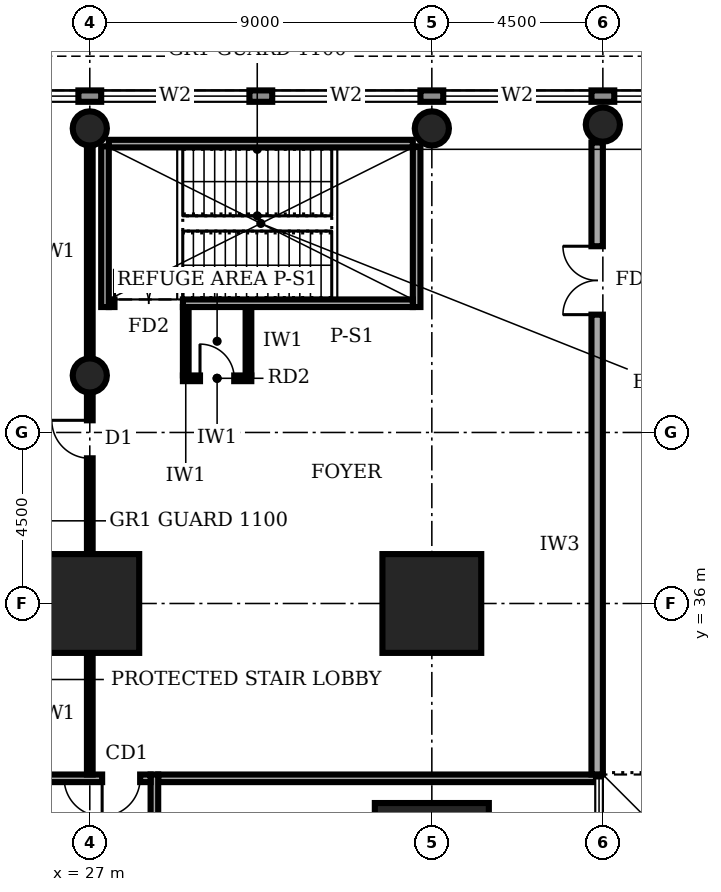
"""IFC4 building model, lengths in metres.
Left out: names, types, materials, properties, quantities, classifications, styles, units other than length and angle.
Written with IfcOpenShell. Run it as: python <this file> out.ifc"""

import sys

from ifc_helpers import new_model, si_unit, direction, frame, frame_2d, origin, origin_2d, place, context, subcontext, project, spatial, rectangle, circle, extrude, element, fill, save


model = new_model("IFC4")
c1 = context("Model", 3, precision=1e-05, world=origin(), true_north=direction((0.0, 1.0)))
c2 = subcontext(c1, "Body", "Model", "MODEL_VIEW")
j1 = project(units=[si_unit("LENGTHUNIT", "METRE"), si_unit("PLANEANGLEUNIT", "RADIAN")], contexts=[c1])
p1 = place(None, origin())
s1 = spatial("IfcSite", under=j1, at=p1, CompositionType="ELEMENT")
p2 = place(p1, origin())
s2 = spatial("IfcBuilding", under=s1, at=p2, CompositionType="ELEMENT")
p3 = place(p2, frame((0.0, 0.0, 6.0)))
s3 = spatial("IfcBuildingStorey", under=s2, at=p3, CompositionType="ELEMENT", Elevation=6.0)
p4 = place(p3, frame((36.0, 29.25, 0.0), z_axis=(0.0, 0.0, 1.0), x_axis=(1.0, 0.0, 0.0)))
e1 = element("IfcColumn", 1, at=p4, inside=s3, PredefinedType="COLUMN", context=c2, shape_type="SweptSolid", body=[
    extrude(rectangle(XDim=3.0, YDim=3.0, at=origin_2d()), origin(), (0.0, 0.0, 1.0), 5.0),
])
for number, where, z_axis, x_axis in (
    (2, (27.0, 36.0, 0.0), (0.0, 0.0, 1.0), (1.0, 0.0, 0.0)),
    (3, (36.0, 36.0, 0.0), (0.0, 0.0, 1.0), (1.0, 0.0, 0.0)),
):
    element("IfcColumn", number, at=place(p3, frame(where, z_axis=z_axis, x_axis=x_axis)), inside=s3, PredefinedType="COLUMN", context=c2, shape_type="SweptSolid", body=[
        extrude(rectangle(XDim=2.6, YDim=2.6, at=origin_2d()), origin(), (0.0, 0.0, 1.0), 5.0),
    ])
for number, where, z_axis, x_axis in (
    (4, (27.0, 42.0, 0.0), (0.0, 0.0, 1.0), (1.0, 0.0, 0.0)),
    (5, (27.0, 48.5, 0.0), (0.0, 0.0, 1.0), (1.0, 0.0, 0.0)),
    (6, (36.0, 48.5, 0.0), (0.0, 0.0, 1.0), (1.0, 0.0, 0.0)),
    (7, (40.5, 48.6, 0.0), (0.0, 0.0, 1.0), (1.0, 0.0, 0.0)),
):
    element("IfcColumn", number, at=place(p3, frame(where, z_axis=z_axis, x_axis=x_axis)), inside=s3, PredefinedType="COLUMN", context=c2, shape_type="SweptSolid", body=[
        extrude(circle(Radius=0.45, at=origin_2d()), origin(), (0.0, 0.0, 1.0), 5.0),
    ])
p5 = place(p3, frame((98.98, 49.35, 0.0), z_axis=(0.0, 0.0, 1.0), x_axis=(-1.0, 0.0, 0.0)))
e8 = element("IfcWall", 8, at=p5, inside=s3, PredefinedType="STANDARD", context=c2, shape_type="SweptSolid", body=[
    extrude(rectangle(XDim=98.96, YDim=0.3, at=frame_2d((49.48, 0.0))), origin(), (0.0, 0.0, 1.0), 4.7),
])
p6 = place(p5, frame((94.78, 0.0, 0.6)))
e9 = element("IfcOpeningElement", 9, at=p6, cuts=e8, PredefinedType="OPENING", context=c2, shape_type="SweptSolid", body=[
    extrude(rectangle(XDim=3.9, YDim=2.6, at=frame_2d((1.95, 1.3))), frame((0.0, 0.16, 0.0), z_axis=(0.0, -1.0, 0.0), x_axis=(1.0, 0.0, 0.0)), (0.0, 0.0, 1.0), 0.32),
])
p7 = place(p5, frame((90.28, 0.0, 0.6)))
e10 = element("IfcOpeningElement", 10, at=p7, cuts=e8, PredefinedType="OPENING", context=c2, shape_type="SweptSolid", body=[
    extrude(rectangle(XDim=3.9, YDim=2.6, at=frame_2d((1.95, 1.3))), frame((0.0, 0.16, 0.0), z_axis=(0.0, -1.0, 0.0), x_axis=(1.0, 0.0, 0.0)), (0.0, 0.0, 1.0), 0.32),
])
p8 = place(p5, frame((85.78, 0.0, 0.6)))
e11 = element("IfcOpeningElement", 11, at=p8, cuts=e8, PredefinedType="OPENING", context=c2, shape_type="SweptSolid", body=[
    extrude(rectangle(XDim=3.9, YDim=2.6, at=frame_2d((1.95, 1.3))), frame((0.0, 0.16, 0.0), z_axis=(0.0, -1.0, 0.0), x_axis=(1.0, 0.0, 0.0)), (0.0, 0.0, 1.0), 0.32),
])
p9 = place(p5, frame((81.28, 0.0, 0.6)))
e12 = element("IfcOpeningElement", 12, at=p9, cuts=e8, PredefinedType="OPENING", context=c2, shape_type="SweptSolid", body=[
    extrude(rectangle(XDim=3.9, YDim=2.6, at=frame_2d((1.95, 1.3))), frame((0.0, 0.16, 0.0), z_axis=(0.0, -1.0, 0.0), x_axis=(1.0, 0.0, 0.0)), (0.0, 0.0, 1.0), 0.32),
])
p10 = place(p5, frame((76.78, 0.0, 0.6)))
e13 = element("IfcOpeningElement", 13, at=p10, cuts=e8, PredefinedType="OPENING", context=c2, shape_type="SweptSolid", body=[
    extrude(rectangle(XDim=3.9, YDim=2.6, at=frame_2d((1.95, 1.3))), frame((0.0, 0.16, 0.0), z_axis=(0.0, -1.0, 0.0), x_axis=(1.0, 0.0, 0.0)), (0.0, 0.0, 1.0), 0.32),
])
p11 = place(p5, frame((72.28, 0.0, 0.6)))
e14 = element("IfcOpeningElement", 14, at=p11, cuts=e8, PredefinedType="OPENING", context=c2, shape_type="SweptSolid", body=[
    extrude(rectangle(XDim=3.9, YDim=2.6, at=frame_2d((1.95, 1.3))), frame((0.0, 0.16, 0.0), z_axis=(0.0, -1.0, 0.0), x_axis=(1.0, 0.0, 0.0)), (0.0, 0.0, 1.0), 0.32),
])
p12 = place(p5, frame((67.78, 0.0, 0.6)))
e15 = element("IfcOpeningElement", 15, at=p12, cuts=e8, PredefinedType="OPENING", context=c2, shape_type="SweptSolid", body=[
    extrude(rectangle(XDim=3.9, YDim=2.6, at=frame_2d((1.95, 1.3))), frame((0.0, 0.16, 0.0), z_axis=(0.0, -1.0, 0.0), x_axis=(1.0, 0.0, 0.0)), (0.0, 0.0, 1.0), 0.32),
])
p13 = place(p5, frame((63.28, 0.0, 0.6)))
e16 = element("IfcOpeningElement", 16, at=p13, cuts=e8, PredefinedType="OPENING", context=c2, shape_type="SweptSolid", body=[
    extrude(rectangle(XDim=3.9, YDim=2.6, at=frame_2d((1.95, 1.3))), frame((0.0, 0.16, 0.0), z_axis=(0.0, -1.0, 0.0), x_axis=(1.0, 0.0, 0.0)), (0.0, 0.0, 1.0), 0.32),
])
p14 = place(p5, frame((58.78, 0.0, 0.6)))
e17 = element("IfcOpeningElement", 17, at=p14, cuts=e8, PredefinedType="OPENING", context=c2, shape_type="SweptSolid", body=[
    extrude(rectangle(XDim=3.9, YDim=2.6, at=frame_2d((1.95, 1.3))), frame((0.0, 0.16, 0.0), z_axis=(0.0, -1.0, 0.0), x_axis=(1.0, 0.0, 0.0)), (0.0, 0.0, 1.0), 0.32),
])
p15 = place(p5, frame((54.28, 0.0, 0.6)))
e18 = element("IfcOpeningElement", 18, at=p15, cuts=e8, PredefinedType="OPENING", context=c2, shape_type="SweptSolid", body=[
    extrude(rectangle(XDim=3.9, YDim=2.6, at=frame_2d((1.95, 1.3))), frame((0.0, 0.16, 0.0), z_axis=(0.0, -1.0, 0.0), x_axis=(1.0, 0.0, 0.0)), (0.0, 0.0, 1.0), 0.32),
])
p16 = place(p5, frame((49.78, 0.0, 0.6)))
e19 = element("IfcOpeningElement", 19, at=p16, cuts=e8, PredefinedType="OPENING", context=c2, shape_type="SweptSolid", body=[
    extrude(rectangle(XDim=3.9, YDim=2.6, at=frame_2d((1.95, 1.3))), frame((0.0, 0.16, 0.0), z_axis=(0.0, -1.0, 0.0), x_axis=(1.0, 0.0, 0.0)), (0.0, 0.0, 1.0), 0.32),
])
p17 = place(p5, frame((45.28, 0.0, 0.6)))
e20 = element("IfcOpeningElement", 20, at=p17, cuts=e8, PredefinedType="OPENING", context=c2, shape_type="SweptSolid", body=[
    extrude(rectangle(XDim=3.9, YDim=2.6, at=frame_2d((1.95, 1.3))), frame((0.0, 0.16, 0.0), z_axis=(0.0, -1.0, 0.0), x_axis=(1.0, 0.0, 0.0)), (0.0, 0.0, 1.0), 0.32),
])
p18 = place(p5, frame((40.78, 0.0, 0.6)))
e21 = element("IfcOpeningElement", 21, at=p18, cuts=e8, PredefinedType="OPENING", context=c2, shape_type="SweptSolid", body=[
    extrude(rectangle(XDim=3.9, YDim=2.6, at=frame_2d((1.95, 1.3))), frame((0.0, 0.16, 0.0), z_axis=(0.0, -1.0, 0.0), x_axis=(1.0, 0.0, 0.0)), (0.0, 0.0, 1.0), 0.32),
])
p19 = place(p5, frame((36.28, 0.0, 0.6)))
e22 = element("IfcOpeningElement", 22, at=p19, cuts=e8, PredefinedType="OPENING", context=c2, shape_type="SweptSolid", body=[
    extrude(rectangle(XDim=3.9, YDim=2.6, at=frame_2d((1.95, 1.3))), frame((0.0, 0.16, 0.0), z_axis=(0.0, -1.0, 0.0), x_axis=(1.0, 0.0, 0.0)), (0.0, 0.0, 1.0), 0.32),
])
p20 = place(p5, frame((31.78, 0.0, 0.6)))
e23 = element("IfcOpeningElement", 23, at=p20, cuts=e8, PredefinedType="OPENING", context=c2, shape_type="SweptSolid", body=[
    extrude(rectangle(XDim=3.9, YDim=2.6, at=frame_2d((1.95, 1.3))), frame((0.0, 0.16, 0.0), z_axis=(0.0, -1.0, 0.0), x_axis=(1.0, 0.0, 0.0)), (0.0, 0.0, 1.0), 0.32),
])
p21 = place(p5, frame((27.28, 0.0, 0.6)))
e24 = element("IfcOpeningElement", 24, at=p21, cuts=e8, PredefinedType="OPENING", context=c2, shape_type="SweptSolid", body=[
    extrude(rectangle(XDim=3.9, YDim=2.6, at=frame_2d((1.95, 1.3))), frame((0.0, 0.16, 0.0), z_axis=(0.0, -1.0, 0.0), x_axis=(1.0, 0.0, 0.0)), (0.0, 0.0, 1.0), 0.32),
])
p22 = place(p5, frame((22.78, 0.0, 0.6)))
e25 = element("IfcOpeningElement", 25, at=p22, cuts=e8, PredefinedType="OPENING", context=c2, shape_type="SweptSolid", body=[
    extrude(rectangle(XDim=3.9, YDim=2.6, at=frame_2d((1.95, 1.3))), frame((0.0, 0.16, 0.0), z_axis=(0.0, -1.0, 0.0), x_axis=(1.0, 0.0, 0.0)), (0.0, 0.0, 1.0), 0.32),
])
p23 = place(p5, frame((18.28, 0.0, 0.6)))
e26 = element("IfcOpeningElement", 26, at=p23, cuts=e8, PredefinedType="OPENING", context=c2, shape_type="SweptSolid", body=[
    extrude(rectangle(XDim=3.9, YDim=2.6, at=frame_2d((1.95, 1.3))), frame((0.0, 0.16, 0.0), z_axis=(0.0, -1.0, 0.0), x_axis=(1.0, 0.0, 0.0)), (0.0, 0.0, 1.0), 0.32),
])
p24 = place(p5, frame((13.78, 0.0, 0.6)))
e27 = element("IfcOpeningElement", 27, at=p24, cuts=e8, PredefinedType="OPENING", context=c2, shape_type="SweptSolid", body=[
    extrude(rectangle(XDim=3.9, YDim=2.6, at=frame_2d((1.95, 1.3))), frame((0.0, 0.16, 0.0), z_axis=(0.0, -1.0, 0.0), x_axis=(1.0, 0.0, 0.0)), (0.0, 0.0, 1.0), 0.32),
])
p25 = place(p5, frame((9.28, 0.0, 0.6)))
e28 = element("IfcOpeningElement", 28, at=p25, cuts=e8, PredefinedType="OPENING", context=c2, shape_type="SweptSolid", body=[
    extrude(rectangle(XDim=3.9, YDim=2.6, at=frame_2d((1.95, 1.3))), frame((0.0, 0.16, 0.0), z_axis=(0.0, -1.0, 0.0), x_axis=(1.0, 0.0, 0.0)), (0.0, 0.0, 1.0), 0.32),
])
p26 = place(p5, frame((4.78, 0.0, 0.6)))
e29 = element("IfcOpeningElement", 29, at=p26, cuts=e8, PredefinedType="OPENING", context=c2, shape_type="SweptSolid", body=[
    extrude(rectangle(XDim=3.9, YDim=2.6, at=frame_2d((1.95, 1.3))), frame((0.0, 0.16, 0.0), z_axis=(0.0, -1.0, 0.0), x_axis=(1.0, 0.0, 0.0)), (0.0, 0.0, 1.0), 0.32),
])
p27 = place(p3, frame((28.7, 9.2, 0.0), z_axis=(0.0, 0.0, 1.0), x_axis=(0.0, 1.0, 0.0)))
e30 = element("IfcWall", 30, at=p27, inside=s3, PredefinedType="SOLIDWALL", context=c2, shape_type="SweptSolid", body=[
    extrude(rectangle(XDim=22.3, YDim=0.2, at=frame_2d((11.15, 0.0))), origin(), (0.0, 0.0, 1.0), 4.7),
])
p28 = place(p27, frame((1.55, 0.0, 0.0)))
e31 = element("IfcOpeningElement", 31, at=p28, cuts=e30, PredefinedType="OPENING", context=c2, shape_type="SweptSolid", body=[
    extrude(rectangle(XDim=1.0, YDim=2.1, at=frame_2d((0.5, 1.05))), frame((0.0, 0.11, 0.0), z_axis=(0.0, -1.0, 0.0), x_axis=(1.0, 0.0, 0.0)), (0.0, 0.0, 1.0), 0.22),
])
p29 = place(p27, frame((7.9, 0.0, 0.0)))
e32 = element("IfcOpeningElement", 32, at=p29, cuts=e30, PredefinedType="OPENING", context=c2, shape_type="SweptSolid", body=[
    extrude(rectangle(XDim=1.8, YDim=2.1, at=frame_2d((0.9, 1.05))), frame((0.0, 0.11, 0.0), z_axis=(0.0, -1.0, 0.0), x_axis=(1.0, 0.0, 0.0)), (0.0, 0.0, 1.0), 0.22),
])
p30 = place(p27, frame((16.9, 0.0, 0.0)))
e33 = element("IfcOpeningElement", 33, at=p30, cuts=e30, PredefinedType="OPENING", context=c2, shape_type="SweptSolid", body=[
    extrude(rectangle(XDim=1.8, YDim=2.1, at=frame_2d((0.9, 1.05))), frame((0.0, 0.11, 0.0), z_axis=(0.0, -1.0, 0.0), x_axis=(1.0, 0.0, 0.0)), (0.0, 0.0, 1.0), 0.22),
])
p31 = place(p3, frame((28.6, 31.4, 0.0), z_axis=(0.0, 0.0, 1.0), x_axis=(-1.0, 0.0, 0.0)))
e34 = element("IfcWall", 34, at=p31, inside=s3, PredefinedType="SOLIDWALL", context=c2, shape_type="SweptSolid", body=[
    extrude(rectangle(XDim=16.9, YDim=0.2, at=frame_2d((8.45, 0.0))), origin(), (0.0, 0.0, 1.0), 4.7),
])
p32 = place(p31, frame((15.4, 0.0, 0.0)))
e35 = element("IfcOpeningElement", 35, at=p32, cuts=e34, PredefinedType="OPENING", context=c2, shape_type="SweptSolid", body=[
    extrude(rectangle(XDim=1.2, YDim=2.4, at=frame_2d((0.6, 1.2))), frame((0.0, 0.11, 0.0), z_axis=(0.0, -1.0, 0.0), x_axis=(1.0, 0.0, 0.0)), (0.0, 0.0, 1.0), 0.22),
])
p33 = place(p31, frame((12.35, 0.0, 0.0)))
e36 = element("IfcOpeningElement", 36, at=p33, cuts=e34, PredefinedType="OPENING", context=c2, shape_type="SweptSolid", body=[
    extrude(rectangle(XDim=1.0, YDim=2.1, at=frame_2d((0.5, 1.05))), frame((0.0, 0.11, 0.0), z_axis=(0.0, -1.0, 0.0), x_axis=(1.0, 0.0, 0.0)), (0.0, 0.0, 1.0), 0.22),
])
p34 = place(p31, frame((7.85, 0.0, 0.0)))
e37 = element("IfcOpeningElement", 37, at=p34, cuts=e34, PredefinedType="OPENING", context=c2, shape_type="SweptSolid", body=[
    extrude(rectangle(XDim=1.0, YDim=2.1, at=frame_2d((0.5, 1.05))), frame((0.0, 0.11, 0.0), z_axis=(0.0, -1.0, 0.0), x_axis=(1.0, 0.0, 0.0)), (0.0, 0.0, 1.0), 0.22),
])
p35 = place(p31, frame((0.275, 0.0, 0.0)))
e38 = element("IfcOpeningElement", 38, at=p35, cuts=e34, PredefinedType="OPENING", context=c2, shape_type="SweptSolid", body=[
    extrude(rectangle(XDim=1.0, YDim=2.1, at=frame_2d((0.5, 1.05))), frame((0.0, 0.11, 0.0), z_axis=(0.0, -1.0, 0.0), x_axis=(1.0, 0.0, 0.0)), (0.0, 0.0, 1.0), 0.22),
])
p36 = place(p31, frame((3.35, 0.0, 0.0)))
e39 = element("IfcOpeningElement", 39, at=p36, cuts=e34, PredefinedType="OPENING", context=c2, shape_type="SweptSolid", body=[
    extrude(rectangle(XDim=1.0, YDim=2.1, at=frame_2d((0.5, 1.05))), frame((0.0, 0.11, 0.0), z_axis=(0.0, -1.0, 0.0), x_axis=(1.0, 0.0, 0.0)), (0.0, 0.0, 1.0), 0.22),
])
p37 = place(p3, frame((28.8, 31.4, 0.0), z_axis=(0.0, 0.0, 1.0), x_axis=(1.0, 0.0, 0.0)))
e40 = element("IfcWall", 40, at=p37, inside=s3, PredefinedType="SOLIDWALL", context=c2, shape_type="SweptSolid", body=[
    extrude(rectangle(XDim=11.52, YDim=0.2, at=frame_2d((5.76, 0.0))), origin(), (0.0, 0.0, 1.0), 4.7),
])
p38 = place(p3, frame((27.0, 31.5, 0.0), z_axis=(0.0, 0.0, 1.0), x_axis=(0.0, 1.0, 0.0)))
e41 = element("IfcWall", 41, at=p38, inside=s3, PredefinedType="PARTITIONING", context=c2, shape_type="SweptSolid", body=[
    extrude(rectangle(XDim=3.18, YDim=0.15, at=frame_2d((1.59, 0.0))), origin(), (0.0, 0.0, 1.0), 3.8),
])
p39 = place(p3, frame((27.0, 37.32, 0.0), z_axis=(0.0, 0.0, 1.0), x_axis=(0.0, 1.0, 0.0)))
e42 = element("IfcWall", 42, at=p39, inside=s3, PredefinedType="PARTITIONING", context=c2, shape_type="SweptSolid", body=[
    extrude(rectangle(XDim=4.21, YDim=0.15, at=frame_2d((2.105, 0.0))), origin(), (0.0, 0.0, 1.0), 3.7),
])
p40 = place(p39, frame((2.5, 0.0, 0.0)))
e43 = element("IfcOpeningElement", 43, at=p40, cuts=e42, PredefinedType="OPENING", context=c2, shape_type="SweptSolid", body=[
    extrude(rectangle(XDim=1.0, YDim=2.1, at=frame_2d((0.5, 1.05))), frame((0.0, 0.085, 0.0), z_axis=(0.0, -1.0, 0.0), x_axis=(1.0, 0.0, 0.0)), (0.0, 0.0, 1.0), 0.17),
])
p41 = place(p3, frame((27.0, 42.47, 0.0), z_axis=(0.0, 0.0, 1.0), x_axis=(0.0, 1.0, 0.0)))
e44 = element("IfcWall", 44, at=p41, inside=s3, PredefinedType="PARTITIONING", context=c2, shape_type="SweptSolid", body=[
    extrude(rectangle(XDim=5.56, YDim=0.15, at=frame_2d((2.78, 0.0))), origin(), (0.0, 0.0, 1.0), 3.7),
])
p42 = place(p3, frame((27.5, 43.9, 0.0), z_axis=(0.0, 0.0, 1.0), x_axis=(1.0, 0.0, 0.0)))
e45 = element("IfcWall", 45, at=p42, inside=s3, PredefinedType="SOLIDWALL", context=c2, shape_type="SweptSolid", body=[
    extrude(rectangle(XDim=8.0, YDim=0.2, at=frame_2d((4.0, 0.0))), origin(), (0.0, 0.0, 1.0), 4.7),
])
p43 = place(p42, frame((0.15, 0.0, 0.0)))
e46 = element("IfcOpeningElement", 46, at=p43, cuts=e45, PredefinedType="OPENING", context=c2, shape_type="SweptSolid", body=[
    extrude(rectangle(XDim=1.8, YDim=2.1, at=frame_2d((0.9, 1.05))), frame((0.0, 0.11, 0.0), z_axis=(0.0, -1.0, 0.0), x_axis=(1.0, 0.0, 0.0)), (0.0, 0.0, 1.0), 0.22),
])
p44 = place(p3, frame((27.5, 48.1, 0.0), z_axis=(0.0, 0.0, 1.0), x_axis=(1.0, 0.0, 0.0)))
e47 = element("IfcWall", 47, at=p44, inside=s3, PredefinedType="SOLIDWALL", context=c2, shape_type="SweptSolid", body=[
    extrude(rectangle(XDim=8.0, YDim=0.2, at=frame_2d((4.0, 0.0))), origin(), (0.0, 0.0, 1.0), 4.7),
])
for number, where, z_axis, x_axis in (
    (48, (27.4, 43.8, 0.0), (0.0, 0.0, 1.0), (0.0, 1.0, 0.0)),
    (49, (35.6, 43.8, 0.0), (0.0, 0.0, 1.0), (0.0, 1.0, 0.0)),
):
    element("IfcWall", number, at=place(p3, frame(where, z_axis=z_axis, x_axis=x_axis)), inside=s3, PredefinedType="SOLIDWALL", context=c2, shape_type="SweptSolid", body=[
        extrude(rectangle(XDim=4.23, YDim=0.2, at=frame_2d((2.115, 0.0))), origin(), (0.0, 0.0, 1.0), 4.7),
    ])
p45 = place(p3, frame((40.35, 31.5, 0.0), z_axis=(0.0, 0.0, 1.0), x_axis=(0.0, 1.0, 0.0)))
e50 = element("IfcWall", 50, at=p45, inside=s3, PredefinedType="SOLIDWALL", context=c2, shape_type="SweptSolid", body=[
    extrude(rectangle(XDim=16.63, YDim=0.3, at=frame_2d((8.315, 0.0))), origin(), (0.0, 0.0, 1.0), 4.7),
])
p46 = place(p45, frame((12.1, 0.0, 0.0)))
e51 = element("IfcOpeningElement", 51, at=p46, cuts=e50, PredefinedType="OPENING", context=c2, shape_type="SweptSolid", body=[
    extrude(rectangle(XDim=1.8, YDim=2.1, at=frame_2d((0.9, 1.05))), frame((0.0, 0.16, 0.0), z_axis=(0.0, -1.0, 0.0), x_axis=(1.0, 0.0, 0.0)), (0.0, 0.0, 1.0), 0.32),
])
p47 = place(p3, frame((31.175, 42.0, 0.0), z_axis=(0.0, 0.0, 1.0), x_axis=(0.0, 1.0, 0.0)))
e52 = element("IfcWall", 52, at=p47, inside=s3, PredefinedType="PARTITIONING", context=c2, shape_type="SweptSolid", body=[
    extrude(rectangle(XDim=1.8, YDim=0.15, at=frame_2d((0.9, 0.0))), origin(), (0.0, 0.0, 1.0), 4.7),
])
p48 = place(p3, frame((29.45, 41.925, 0.0), z_axis=(0.0, 0.0, 1.0), x_axis=(1.0, 0.0, 0.0)))
e53 = element("IfcWall", 53, at=p48, inside=s3, PredefinedType="PARTITIONING", context=c2, shape_type="SweptSolid", body=[
    extrude(rectangle(XDim=1.8, YDim=0.15, at=frame_2d((0.9, 0.0))), origin(), (0.0, 0.0, 1.0), 4.7),
])
p49 = place(p48, frame((0.45, 0.0, 0.0)))
e54 = element("IfcOpeningElement", 54, at=p49, cuts=e53, PredefinedType="OPENING", context=c2, shape_type="SweptSolid", body=[
    extrude(rectangle(XDim=0.9, YDim=2.1, at=frame_2d((0.45, 1.05))), frame((0.0, 0.085, 0.0), z_axis=(0.0, -1.0, 0.0), x_axis=(1.0, 0.0, 0.0)), (0.0, 0.0, 1.0), 0.17),
])
p50 = place(p3, frame((29.525, 42.0, 0.0), z_axis=(0.0, 0.0, 1.0), x_axis=(0.0, 1.0, 0.0)))
e55 = element("IfcWall", 55, at=p50, inside=s3, PredefinedType="PARTITIONING", context=c2, shape_type="SweptSolid", body=[
    extrude(rectangle(XDim=1.8, YDim=0.15, at=frame_2d((0.9, 0.0))), origin(), (0.0, 0.0, 1.0), 4.7),
])
p51 = place(p11, origin())
e56 = element("IfcWindow", 56, at=p51, inside=s3, PartitioningType="SINGLE_PANEL", PredefinedType="WINDOW", context=c2, shape_type="SweptSolid", body=[
    extrude(rectangle(XDim=3.9, YDim=2.6, at=frame_2d((1.95, 1.3))), frame((0.0, 0.03, 0.0), z_axis=(0.0, -1.0, 0.0), x_axis=(1.0, 0.0, 0.0)), (0.0, 0.0, 1.0), 0.06),
])
fill(e14, e56)
p52 = place(p12, origin())
e57 = element("IfcWindow", 57, at=p52, inside=s3, PartitioningType="SINGLE_PANEL", PredefinedType="WINDOW", context=c2, shape_type="SweptSolid", body=[
    extrude(rectangle(XDim=3.9, YDim=2.6, at=frame_2d((1.95, 1.3))), frame((0.0, 0.03, 0.0), z_axis=(0.0, -1.0, 0.0), x_axis=(1.0, 0.0, 0.0)), (0.0, 0.0, 1.0), 0.06),
])
fill(e15, e57)
p53 = place(p13, origin())
e58 = element("IfcWindow", 58, at=p53, inside=s3, PartitioningType="SINGLE_PANEL", PredefinedType="WINDOW", context=c2, shape_type="SweptSolid", body=[
    extrude(rectangle(XDim=3.9, YDim=2.6, at=frame_2d((1.95, 1.3))), frame((0.0, 0.03, 0.0), z_axis=(0.0, -1.0, 0.0), x_axis=(1.0, 0.0, 0.0)), (0.0, 0.0, 1.0), 0.06),
])
fill(e16, e58)
p54 = place(p14, origin())
e59 = element("IfcWindow", 59, at=p54, inside=s3, PartitioningType="SINGLE_PANEL", PredefinedType="WINDOW", context=c2, shape_type="SweptSolid", body=[
    extrude(rectangle(XDim=3.9, YDim=2.6, at=frame_2d((1.95, 1.3))), frame((0.0, 0.03, 0.0), z_axis=(0.0, -1.0, 0.0), x_axis=(1.0, 0.0, 0.0)), (0.0, 0.0, 1.0), 0.06),
])
fill(e17, e59)
p55 = place(p15, origin())
e60 = element("IfcWindow", 60, at=p55, inside=s3, PartitioningType="SINGLE_PANEL", PredefinedType="WINDOW", context=c2, shape_type="SweptSolid", body=[
    extrude(rectangle(XDim=3.9, YDim=2.6, at=frame_2d((1.95, 1.3))), frame((0.0, 0.03, 0.0), z_axis=(0.0, -1.0, 0.0), x_axis=(1.0, 0.0, 0.0)), (0.0, 0.0, 1.0), 0.06),
])
fill(e18, e60)
p56 = place(p35, origin())
e61 = element("IfcDoor", 61, at=p56, inside=s3, OperationType="SINGLE_SWING_RIGHT", PredefinedType="DOOR", context=c2, shape_type="SweptSolid", body=[
    extrude(rectangle(XDim=1.0, YDim=2.1, at=frame_2d((0.5, 1.05))), frame((0.0, 0.025, 0.0), z_axis=(0.0, -1.0, 0.0), x_axis=(1.0, 0.0, 0.0)), (0.0, 0.0, 1.0), 0.05),
])
fill(e38, e61)
p57 = place(p40, origin())
e62 = element("IfcDoor", 62, at=p57, inside=s3, OperationType="SINGLE_SWING_RIGHT", PredefinedType="DOOR", context=c2, shape_type="SweptSolid", body=[
    extrude(rectangle(XDim=1.0, YDim=2.1, at=frame_2d((0.5, 1.05))), frame((0.0, 0.025, 0.0), z_axis=(0.0, -1.0, 0.0), x_axis=(1.0, 0.0, 0.0)), (0.0, 0.0, 1.0), 0.05),
])
fill(e43, e62)
p58 = place(p43, origin())
e63 = element("IfcDoor", 63, at=p58, inside=s3, OperationType="DOUBLE_DOOR_SINGLE_SWING", PredefinedType="DOOR", context=c2, shape_type="SweptSolid", body=[
    extrude(rectangle(XDim=1.8, YDim=2.1, at=frame_2d((0.9, 1.05))), frame((0.0, 0.025, 0.0), z_axis=(0.0, -1.0, 0.0), x_axis=(1.0, 0.0, 0.0)), (0.0, 0.0, 1.0), 0.05),
])
fill(e46, e63)
p59 = place(p46, origin())
e64 = element("IfcDoor", 64, at=p59, inside=s3, OperationType="DOUBLE_DOOR_SINGLE_SWING", PredefinedType="DOOR", context=c2, shape_type="SweptSolid", body=[
    extrude(rectangle(XDim=1.8, YDim=2.1, at=frame_2d((0.9, 1.05))), frame((0.0, 0.025, 0.0), z_axis=(0.0, -1.0, 0.0), x_axis=(1.0, 0.0, 0.0)), (0.0, 0.0, 1.0), 0.05),
])
fill(e51, e64)
p60 = place(p49, origin())
e65 = element("IfcDoor", 65, at=p60, inside=s3, OperationType="SINGLE_SWING_LEFT", PredefinedType="DOOR", context=c2, shape_type="SweptSolid", body=[
    extrude(rectangle(XDim=0.9, YDim=2.1, at=frame_2d((0.45, 1.05))), frame((0.0, 0.025, 0.0), z_axis=(0.0, -1.0, 0.0), x_axis=(1.0, 0.0, 0.0)), (0.0, 0.0, 1.0), 0.05),
])
fill(e54, e65)
save(model, sys.argv[1])
